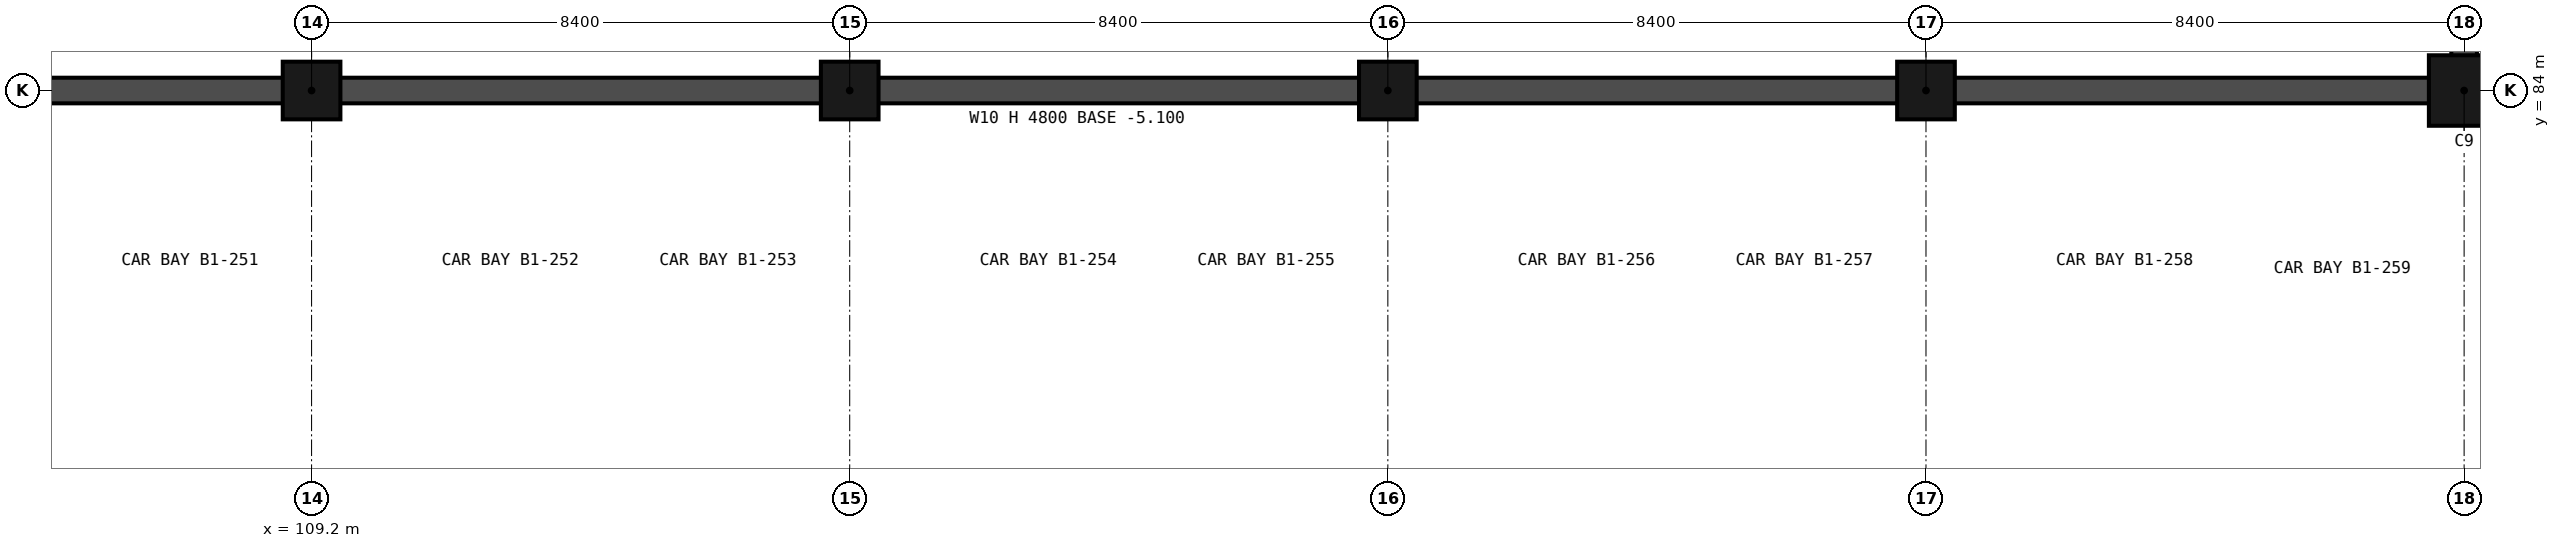
"""IFC4 building model, lengths in metres.
Left out: names, types, materials, properties, quantities, classifications, styles, units other than length and angle.
Written with IfcOpenShell. Run it as: python <this file> out.ifc"""

import sys

from ifc_helpers import new_model, si_unit, direction, frame, frame_2d, origin, origin_2d, place, context, subcontext, project, spatial, rectangle, extrude, element, save


model = new_model("IFC4")
c1 = context("Model", 3, precision=1e-05, world=origin(), true_north=direction((0.0, 1.0)))
c2 = subcontext(c1, "Body", "Model", "MODEL_VIEW")
j1 = project(units=[si_unit("LENGTHUNIT", "METRE"), si_unit("PLANEANGLEUNIT", "RADIAN")], contexts=[c1])
p1 = place(None, origin())
s1 = spatial("IfcSite", under=j1, at=p1, CompositionType="ELEMENT")
p2 = place(p1, origin())
s2 = spatial("IfcBuilding", under=s1, at=p2, CompositionType="ELEMENT")
p3 = place(p2, frame((0.0, 0.0, -4.8)))
s3 = spatial("IfcBuildingStorey", under=s2, at=p3, CompositionType="ELEMENT", Elevation=-4.8)
for number, where, z_axis, x_axis in (
    (1, (109.2, 84.0, -0.3), (0.0, 0.0, 1.0), (1.0, 0.0, 0.0)),
    (2, (117.6, 84.0, -0.3), (0.0, 0.0, 1.0), (1.0, 0.0, 0.0)),
    (3, (126.0, 84.0, -0.3), (0.0, 0.0, 1.0), (1.0, 0.0, 0.0)),
    (4, (134.4, 84.0, -0.3), (0.0, 0.0, 1.0), (1.0, 0.0, 0.0)),
):
    element("IfcColumn", number, at=place(p3, frame(where, z_axis=z_axis, x_axis=x_axis)), inside=s3, PredefinedType="COLUMN", context=c2, shape_type="SweptSolid", body=[
        extrude(rectangle(XDim=0.9, YDim=0.9, at=origin_2d()), origin(), (0.0, 0.0, 1.0), 4.8),
    ])
p4 = place(p3, frame((142.8, 84.0, -0.3), z_axis=(0.0, 0.0, 1.0), x_axis=(1.0, 0.0, 0.0)))
e5 = element("IfcColumn", 5, at=p4, inside=s3, PredefinedType="COLUMN", context=c2, shape_type="SweptSolid", body=[
    extrude(rectangle(XDim=1.1, YDim=1.1, at=origin_2d()), origin(), (0.0, 0.0, 1.0), 4.8),
])
p5 = place(p3, frame((142.8, 117.8, -0.3), z_axis=(0.0, 0.0, 1.0), x_axis=(0.0, -1.0, 0.0)))
e6 = element("IfcWall", 6, at=p5, inside=s3, PredefinedType="SOLIDWALL", context=c2, shape_type="SweptSolid", body=[
    extrude(rectangle(XDim=34.0, YDim=0.4, at=frame_2d((17.0, 0.0))), origin(), (0.0, 0.0, 1.0), 4.8),
])
p6 = place(p3, frame((143.0, 84.0, -0.3), z_axis=(0.0, 0.0, 1.0), x_axis=(-1.0, 0.0, 0.0)))
e7 = element("IfcWall", 7, at=p6, inside=s3, PredefinedType="SOLIDWALL", context=c2, shape_type="SweptSolid", body=[
    extrude(rectangle(XDim=109.6, YDim=0.4, at=frame_2d((54.8, 0.0))), origin(), (0.0, 0.0, 1.0), 4.8),
])
p7 = place(p3, frame((143.0, 84.0, 0.0), z_axis=(0.0, 0.0, 1.0), x_axis=(1.0, 0.0, 0.0)))
e8 = element("IfcWall", 8, at=p7, inside=s3, PredefinedType="SOLIDWALL", context=c2, shape_type="SweptSolid", body=[
    extrude(rectangle(XDim=16.7, YDim=0.2, at=frame_2d((8.35, 0.0))), origin(), (0.0, 0.0, 1.0), 3.5),
])
p8 = place(p7, frame((3.4, 0.0, 0.0)))
e9 = element("IfcOpeningElement", 9, at=p8, cuts=e8, PredefinedType="OPENING", context=c2, shape_type="SweptSolid", body=[
    extrude(rectangle(XDim=1.2, YDim=2.4, at=frame_2d((0.6, 1.2))), frame((0.0, 0.11, 0.0), z_axis=(0.0, -1.0, 0.0), x_axis=(1.0, 0.0, 0.0)), (0.0, 0.0, 1.0), 0.22),
])
p9 = place(p7, frame((10.5, 0.0, 0.0)))
e10 = element("IfcOpeningElement", 10, at=p9, cuts=e8, PredefinedType="OPENING", context=c2, shape_type="SweptSolid", body=[
    extrude(rectangle(XDim=1.2, YDim=2.4, at=frame_2d((0.6, 1.2))), frame((0.0, 0.11, 0.0), z_axis=(0.0, -1.0, 0.0), x_axis=(1.0, 0.0, 0.0)), (0.0, 0.0, 1.0), 0.22),
])
p10 = place(p7, frame((14.8, 0.0, 0.0)))
e11 = element("IfcOpeningElement", 11, at=p10, cuts=e8, PredefinedType="OPENING", context=c2, shape_type="SweptSolid", body=[
    extrude(rectangle(XDim=1.0, YDim=2.1, at=frame_2d((0.5, 1.05))), frame((0.0, 0.11, 0.0), z_axis=(0.0, -1.0, 0.0), x_axis=(1.0, 0.0, 0.0)), (0.0, 0.0, 1.0), 0.22),
])
save(model, sys.argv[1])
